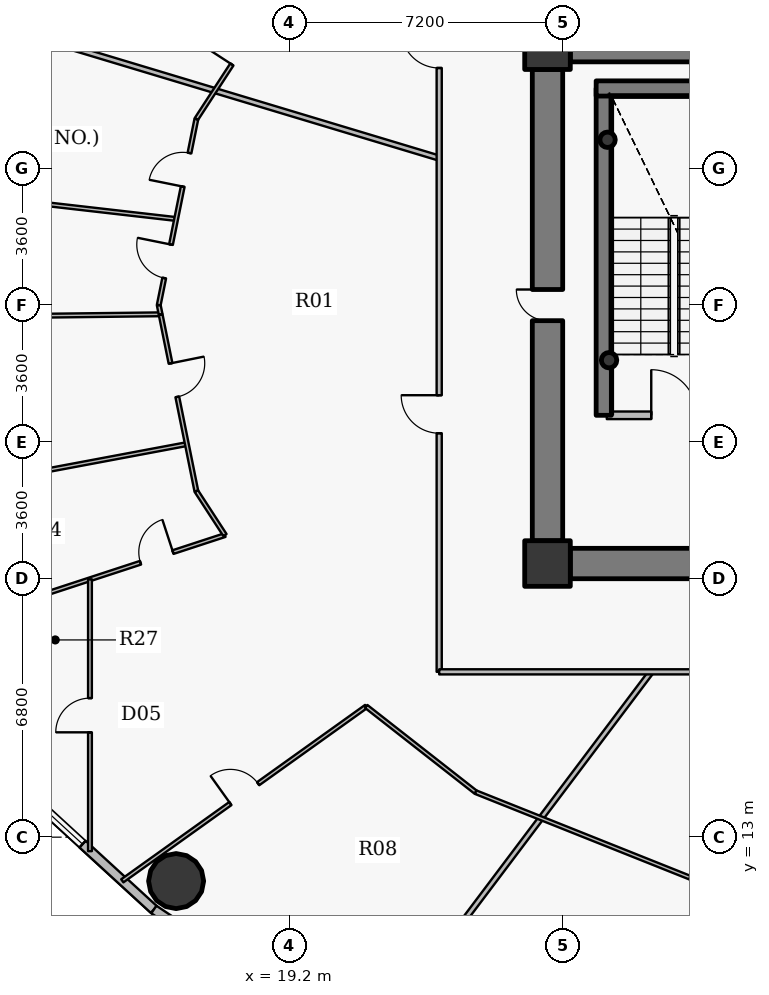
"""IFC4 building model, lengths in metres.
Left out: names, types, materials, properties, quantities, classifications, styles, units other than length and angle.
Written with IfcOpenShell. Run it as: python <this file> out.ifc"""

import sys

from ifc_helpers import new_model, si_unit, direction, frame, frame_2d, origin, origin_2d, place, context, subcontext, project, spatial, rectangle, hollow_circle, extrude, source, transform, mapped, element, fill, save


model = new_model("IFC4")
c1 = context("Model", 3, precision=1e-05, world=origin(), true_north=direction((0.0, 1.0)))
c2 = subcontext(c1, "Body", "Model", "MODEL_VIEW")
j1 = project(units=[si_unit("LENGTHUNIT", "METRE"), si_unit("PLANEANGLEUNIT", "RADIAN")], contexts=[c1])
p1 = place(None, origin())
s1 = spatial("IfcSite", under=j1, at=p1, CompositionType="ELEMENT")
p2 = place(p1, origin())
s2 = spatial("IfcBuilding", under=s1, at=p2, CompositionType="ELEMENT")
p3 = place(p2, frame((0.0, 0.0, 108.45)))
s3 = spatial("IfcBuildingStorey", under=s2, at=p3, CompositionType="ELEMENT", Elevation=108.45)
for number, where, z_axis, x_axis in (
    (1, (26.0, 20.2, 0.0), (0.0, 0.0, 1.0), (1.0, 0.0, 0.0)),
    (2, (26.0, 33.8, 0.0), (0.0, 0.0, 1.0), (1.0, 0.0, 0.0)),
):
    element("IfcColumn", number, at=place(p3, frame(where, z_axis=z_axis, x_axis=x_axis)), inside=s3, PredefinedType="COLUMN", context=c2, shape_type="SweptSolid", body=[
        extrude(rectangle(XDim=1.2, YDim=1.2, at=origin_2d()), origin(), (0.0, 0.0, 1.0), 3.75),
    ])
p4 = place(p3, frame((27.48, 24.1, 0.0), z_axis=(0.0, 0.0, 1.0), x_axis=(0.0, 1.0, 0.0)))
e3 = element("IfcWall", 3, at=p4, inside=s3, PredefinedType="SHEAR", context=c2, shape_type="SweptSolid", body=[
    extrude(rectangle(XDim=8.6, YDim=0.4, at=frame_2d((4.3, 0.0))), origin(), (0.0, 0.0, 1.0), 3.75),
])
p5 = place(p3, frame((27.28, 32.7, 0.0), z_axis=(0.0, 0.0, 1.0), x_axis=(1.0, 0.0, 0.0)))
e4 = element("IfcWall", 4, at=p5, inside=s3, PredefinedType="SHEAR", context=c2, shape_type="SweptSolid", body=[
    extrude(rectangle(XDim=4.1, YDim=0.4, at=frame_2d((2.05, 0.0))), origin(), (0.0, 0.0, 1.0), 3.75),
])
for number, where, z_axis, x_axis in (
    (5, (27.58, 31.35, 0.0), (0.0, 0.0, 1.0), (1.0, 0.0, 0.0)),
    (6, (27.62, 25.55, 0.0), (0.0, 0.0, 1.0), (1.0, 0.0, 0.0)),
):
    element("IfcColumn", number, at=place(p3, frame(where, z_axis=z_axis, x_axis=x_axis)), inside=s3, PredefinedType="COLUMN", context=c2, shape_type="SweptSolid", body=[
        extrude(hollow_circle(Radius=0.203, WallThickness=0.016, at=origin_2d()), origin(), (0.0, 0.0, 1.0), 3.75),
    ])
p6 = place(p3, frame((26.6, 33.8, 0.0), z_axis=(0.0, 0.0, 1.0), x_axis=(1.0, 0.0, 0.0)))
e7 = element("IfcWall", 7, at=p6, inside=s3, PredefinedType="SHEAR", context=c2, shape_type="SweptSolid", body=[
    extrude(rectangle(XDim=18.8, YDim=0.8, at=frame_2d((9.4, 0.0))), origin(), (0.0, 0.0, 1.0), 2.95),
])
p7 = place(p3, frame((45.4, 20.2, 0.0), z_axis=(0.0, 0.0, 1.0), x_axis=(-1.0, 0.0, 0.0)))
e8 = element("IfcWall", 8, at=p7, inside=s3, PredefinedType="SHEAR", context=c2, shape_type="SweptSolid", body=[
    extrude(rectangle(XDim=18.8, YDim=0.8, at=frame_2d((9.4, 0.0))), origin(), (0.0, 0.0, 1.0), 2.95),
])
p8 = place(p7, frame((10.15, 0.0, 0.0)))
e9 = element("IfcOpeningElement", 9, at=p8, cuts=e8, PredefinedType="OPENING", context=c2, shape_type="SweptSolid", body=[
    extrude(rectangle(XDim=1.15, YDim=2.15, at=origin_2d()), frame((0.575, 0.41, 1.075), z_axis=(0.0, -1.0, 0.0), x_axis=(1.0, 0.0, 0.0)), (0.0, 0.0, 1.0), 0.82),
])
p9 = place(p3, frame((26.0, 20.8, 0.0), z_axis=(0.0, 0.0, 1.0), x_axis=(0.0, 1.0, 0.0)))
e10 = element("IfcWall", 10, at=p9, inside=s3, PredefinedType="SHEAR", context=c2, shape_type="SweptSolid", body=[
    extrude(rectangle(XDim=12.4, YDim=0.8, at=frame_2d((6.2, 0.0))), origin(), (0.0, 0.0, 1.0), 2.95),
])
p10 = place(p9, frame((5.79, 0.0, 0.0)))
e11 = element("IfcOpeningElement", 11, at=p10, cuts=e10, PredefinedType="OPENING", context=c2, shape_type="SweptSolid", body=[
    extrude(rectangle(XDim=0.82, YDim=2.1, at=origin_2d()), frame((0.41, 0.41, 1.05), z_axis=(0.0, -1.0, 0.0), x_axis=(1.0, 0.0, 0.0)), (0.0, 0.0, 1.0), 0.82),
])
p11 = place(p3, frame((16.227, 11.844, 0.0), z_axis=(0.0, 0.0, 1.0), x_axis=(1.0, 0.0, 0.0)))
e12 = element("IfcColumn", 12, at=p11, inside=s3, PredefinedType="COLUMN", context=c2, shape_type="SweptSolid", body=[
    extrude(hollow_circle(Radius=0.725, WallThickness=0.042, at=origin_2d()), origin(), (0.0, 0.0, 1.0), 3.75),
])
p12 = place(p3, frame((15.642, 11.097, 0.0), z_axis=(0.0, 0.0, 1.0), x_axis=(-0.737113356241, 0.675769117414, 0.0)))
e13 = element("IfcWall", 13, at=p12, inside=s3, PredefinedType="SOLIDWALL", context=c2, shape_type="SweptSolid", body=[
    extrude(rectangle(XDim=3.976, YDim=0.24, at=frame_2d((1.988, 0.0))), origin(), (0.0, 0.0, 1.0), 3.5),
])
p13 = place(p12, frame((2.546, 0.0, 0.9)))
e14 = element("IfcOpeningElement", 14, at=p13, cuts=e13, PredefinedType="OPENING", context=c2, shape_type="SweptSolid", body=[
    extrude(rectangle(XDim=1.25, YDim=1.65, at=origin_2d()), frame((0.625, 0.13, 0.825), z_axis=(0.0, -1.0, 0.0), x_axis=(1.0, 0.0, 0.0)), (0.0, 0.0, 1.0), 0.26),
])
p14 = place(p3, frame((19.075, 8.801, 0.0), z_axis=(0.0, 0.0, 1.0), x_axis=(-0.831221811447, 0.555940914284, 0.0)))
e15 = element("IfcWall", 15, at=p14, inside=s3, PredefinedType="SOLIDWALL", context=c2, shape_type="SweptSolid", body=[
    extrude(rectangle(XDim=4.13, YDim=0.24, at=frame_2d((2.065, 0.0))), origin(), (0.0, 0.0, 1.0), 3.5),
])
p15 = place(p14, frame((1.065, 0.0, 0.9)))
e16 = element("IfcOpeningElement", 16, at=p15, cuts=e15, PredefinedType="OPENING", context=c2, shape_type="SweptSolid", body=[
    extrude(rectangle(XDim=2.0, YDim=1.75, at=origin_2d()), frame((1.0, 0.13, 0.875), z_axis=(0.0, -1.0, 0.0), x_axis=(1.0, 0.0, 0.0)), (0.0, 0.0, 1.0), 0.26),
])
p16 = place(p3, frame((7.255, 26.655, 0.0), z_axis=(0.0, 0.0, 1.0), x_axis=(0.999927994094, 0.012000276098, 0.0)))
e17 = element("IfcWall", 17, at=p16, inside=s3, PredefinedType="PARTITIONING", context=c2, shape_type="SweptSolid", body=[
    extrude(rectangle(XDim=8.565, YDim=0.1, at=frame_2d((4.283, 0.0))), origin(), (0.0, 0.0, 1.0), 2.935),
])
p17 = place(p3, frame((7.548, 30.259, 0.0), z_axis=(0.0, 0.0, 1.0), x_axis=(0.993502465776, -0.11381059044, 0.0)))
e18 = element("IfcWall", 18, at=p17, inside=s3, PredefinedType="PARTITIONING", context=c2, shape_type="SweptSolid", body=[
    extrude(rectangle(XDim=8.737, YDim=0.1, at=frame_2d((4.369, 0.0))), origin(), (0.0, 0.0, 1.0), 2.935),
])
p18 = place(p3, frame((8.1, 21.765, 0.0), z_axis=(0.0, 0.0, 1.0), x_axis=(0.982848598081, 0.184414297849, 0.0)))
e19 = element("IfcWall", 19, at=p18, inside=s3, PredefinedType="PARTITIONING", context=c2, shape_type="SweptSolid", body=[
    extrude(rectangle(XDim=8.556, YDim=0.1, at=frame_2d((4.278, 0.0))), origin(), (0.0, 0.0, 1.0), 2.935),
])
p19 = place(p3, frame((9.215, 35.062, 0.0), z_axis=(0.0, 0.0, 1.0), x_axis=(0.957569176287, -0.288203526393, 0.0)))
e20 = element("IfcWall", 20, at=p19, inside=s3, PredefinedType="PARTITIONING", context=c2, shape_type="SweptSolid", body=[
    extrude(rectangle(XDim=14.552, YDim=0.135, at=frame_2d((7.276, 0.0))), origin(), (0.0, 0.0, 1.0), 2.935),
])
p20 = place(p3, frame((9.533, 18.337, 0.0), z_axis=(0.0, 0.0, 1.0), x_axis=(0.950384937961, 0.311076308478, 0.0)))
e21 = element("IfcWall", 21, at=p20, inside=s3, PredefinedType="PARTITIONING", context=c2, shape_type="SweptSolid", body=[
    extrude(rectangle(XDim=8.396, YDim=0.1, at=frame_2d((4.198, 0.0))), origin(), (0.0, 0.0, 1.0), 2.935),
])
p21 = place(p20, frame((6.057, 0.0, 0.0)))
e22 = element("IfcOpeningElement", 22, at=p21, cuts=e21, PredefinedType="OPENING", context=c2, shape_type="SweptSolid", body=[
    extrude(rectangle(XDim=0.9, YDim=2.1, at=origin_2d()), frame((0.45, 0.06, 1.05), z_axis=(0.0, -1.0, 0.0), x_axis=(1.0, 0.0, 0.0)), (0.0, 0.0, 1.0), 0.12),
])
p22 = place(p20, frame((0.88, 0.0, 0.0)))
e23 = element("IfcOpeningElement", 23, at=p22, cuts=e21, PredefinedType="OPENING", context=c2, shape_type="SweptSolid", body=[
    extrude(rectangle(XDim=0.82, YDim=2.1, at=origin_2d()), frame((0.41, 0.06, 1.05), z_axis=(0.0, -1.0, 0.0), x_axis=(1.0, 0.0, 0.0)), (0.0, 0.0, 1.0), 0.12),
])
p23 = place(p3, frame((13.96, 12.631, 0.0), z_axis=(0.0, 0.0, 1.0), x_axis=(0.0, 1.0, 0.0)))
e24 = element("IfcWall", 24, at=p23, inside=s3, PredefinedType="PARTITIONING", context=c2, shape_type="SweptSolid", body=[
    extrude(rectangle(XDim=7.154, YDim=0.1, at=frame_2d((3.577, 0.0))), origin(), (0.0, 0.0, 1.0), 2.935),
])
p24 = place(p23, frame((3.127, 0.0, 0.0)))
e25 = element("IfcOpeningElement", 25, at=p24, cuts=e24, PredefinedType="OPENING", context=c2, shape_type="SweptSolid", body=[
    extrude(rectangle(XDim=0.9, YDim=2.1, at=origin_2d()), frame((0.45, 0.06, 1.05), z_axis=(0.0, -1.0, 0.0), x_axis=(1.0, 0.0, 0.0)), (0.0, 0.0, 1.0), 0.12),
])
p25 = place(p3, frame((14.811, 11.851, 0.0), z_axis=(0.0, 0.0, 1.0), x_axis=(0.813476205606, 0.581598197137, 0.0)))
e26 = element("IfcWall", 26, at=p25, inside=s3, PredefinedType="PARTITIONING", context=c2, shape_type="SweptSolid", body=[
    extrude(rectangle(XDim=7.889, YDim=0.1, at=frame_2d((3.945, 0.0))), origin(), (0.0, 0.0, 1.0), 2.935),
])
p26 = place(p25, frame((3.495, 0.0, 0.0)))
e27 = element("IfcOpeningElement", 27, at=p26, cuts=e26, PredefinedType="OPENING", context=c2, shape_type="SweptSolid", body=[
    extrude(rectangle(XDim=0.9, YDim=2.1, at=origin_2d()), frame((0.45, 0.06, 1.05), z_axis=(0.0, -1.0, 0.0), x_axis=(1.0, 0.0, 0.0)), (0.0, 0.0, 1.0), 0.12),
])
p27 = place(p3, frame((15.77, 27.0, 0.0), z_axis=(0.0, 0.0, 1.0), x_axis=(0.198585481658, -0.980083571169, 0.0)))
e28 = element("IfcWall", 28, at=p27, inside=s3, PredefinedType="PARTITIONING", context=c2, shape_type="SweptSolid", body=[
    extrude(rectangle(XDim=0.247, YDim=0.1, at=frame_2d((0.124, 0.0))), origin(), (0.0, 0.0, 1.0), 2.935),
])
p28 = place(p3, frame((15.77, 27.0, 0.0), z_axis=(0.0, 0.0, 1.0), x_axis=(0.19822142127, 0.980157267049, 0.0)))
e29 = element("IfcWall", 29, at=p28, inside=s3, PredefinedType="PARTITIONING", context=c2, shape_type="SweptSolid", body=[
    extrude(rectangle(XDim=4.994, YDim=0.1, at=frame_2d((2.497, 0.0))), origin(), (0.0, 0.0, 1.0), 2.935),
])
p29 = place(p28, frame((3.183, 0.0, 0.0)))
e30 = element("IfcOpeningElement", 30, at=p29, cuts=e29, PredefinedType="OPENING", context=c2, shape_type="SweptSolid", body=[
    extrude(rectangle(XDim=0.9, YDim=2.1, at=origin_2d()), frame((0.45, 0.06, 1.05), z_axis=(0.0, -1.0, 0.0), x_axis=(1.0, 0.0, 0.0)), (0.0, 0.0, 1.0), 0.12),
])
p30 = place(p28, frame((0.725, 0.0, 0.0)))
e31 = element("IfcOpeningElement", 31, at=p30, cuts=e29, PredefinedType="OPENING", context=c2, shape_type="SweptSolid", body=[
    extrude(rectangle(XDim=0.9, YDim=2.1, at=origin_2d()), frame((0.45, 0.06, 1.05), z_axis=(0.0, -1.0, 0.0), x_axis=(1.0, 0.0, 0.0)), (0.0, 0.0, 1.0), 0.12),
])
p31 = place(p3, frame((15.821, 26.748, 0.0), z_axis=(0.0, 0.0, 1.0), x_axis=(0.198216867743, -0.980158187918, 0.0)))
e32 = element("IfcWall", 32, at=p31, inside=s3, PredefinedType="PARTITIONING", context=c2, shape_type="SweptSolid", body=[
    extrude(rectangle(XDim=4.737, YDim=0.1, at=frame_2d((2.369, 0.0))), origin(), (0.0, 0.0, 1.0), 2.935),
])
p32 = place(p31, frame((1.307, 0.0, 0.0)))
e33 = element("IfcOpeningElement", 33, at=p32, cuts=e32, PredefinedType="OPENING", context=c2, shape_type="SweptSolid", body=[
    extrude(rectangle(XDim=0.9, YDim=2.1, at=origin_2d()), frame((0.45, 0.06, 1.05), z_axis=(0.0, -1.0, 0.0), x_axis=(1.0, 0.0, 0.0)), (0.0, 0.0, 1.0), 0.12),
])
p33 = place(p3, frame((16.76, 22.105, 0.0), z_axis=(0.0, 0.0, 1.0), x_axis=(0.54547956044, -0.83812412514, 0.0)))
e34 = element("IfcWall", 34, at=p33, inside=s3, PredefinedType="PARTITIONING", context=c2, shape_type="SweptSolid", body=[
    extrude(rectangle(XDim=1.38, YDim=0.1, at=frame_2d((0.69, 0.0))), origin(), (0.0, 0.0, 1.0), 2.935),
])
p34 = place(p3, frame((16.76, 31.895, 0.0), z_axis=(0.0, 0.0, 1.0), x_axis=(0.545405249109, 0.838172484781, 0.0)))
e35 = element("IfcWall", 35, at=p34, inside=s3, PredefinedType="PARTITIONING", context=c2, shape_type="SweptSolid", body=[
    extrude(rectangle(XDim=5.269, YDim=0.1, at=frame_2d((2.634, 0.0))), origin(), (0.0, 0.0, 1.0), 2.935),
])
p35 = place(p34, frame((1.713, 0.0, 0.0)))
e36 = element("IfcOpeningElement", 36, at=p35, cuts=e35, PredefinedType="OPENING", context=c2, shape_type="SweptSolid", body=[
    extrude(rectangle(XDim=0.9, YDim=2.1, at=origin_2d()), frame((0.45, 0.06, 1.05), z_axis=(0.0, -1.0, 0.0), x_axis=(1.0, 0.0, 0.0)), (0.0, 0.0, 1.0), 0.12),
])
p36 = place(p3, frame((21.229, 16.44, 0.0), z_axis=(0.0, 0.0, 1.0), x_axis=(0.787324700524, -0.616538576201, 0.0)))
e37 = element("IfcWall", 37, at=p36, inside=s3, PredefinedType="PARTITIONING", context=c2, shape_type="SweptSolid", body=[
    extrude(rectangle(XDim=3.658, YDim=0.1, at=frame_2d((1.829, 0.0))), origin(), (0.0, 0.0, 1.0), 2.935),
])
p37 = place(p3, frame((21.43, 7.665, 0.0), z_axis=(0.0, 0.0, 1.0), x_axis=(0.601821582461, 0.798630567211, 0.0)))
e38 = element("IfcWall", 38, at=p37, inside=s3, PredefinedType="PARTITIONING", context=c2, shape_type="SweptSolid", body=[
    extrude(rectangle(XDim=12.127, YDim=0.135, at=frame_2d((6.063, 0.0))), origin(), (0.0, 0.0, 1.0), 2.935),
])
p38 = place(p3, frame((23.15, 17.35, 0.0), z_axis=(0.0, 0.0, 1.0), x_axis=(0.0, 1.0, 0.0)))
e39 = element("IfcWall", 39, at=p38, inside=s3, PredefinedType="PARTITIONING", context=c2, shape_type="SweptSolid", body=[
    extrude(rectangle(XDim=19.3, YDim=0.135, at=frame_2d((9.65, 0.0))), origin(), (0.0, 0.0, 1.0), 2.935),
])
p39 = place(p38, frame((15.889, 0.0, 0.0)))
e40 = element("IfcOpeningElement", 40, at=p39, cuts=e39, PredefinedType="OPENING", context=c2, shape_type="SweptSolid", body=[
    extrude(rectangle(XDim=1.0, YDim=2.15, at=origin_2d()), frame((0.5, 0.078, 1.075), z_axis=(0.0, -1.0, 0.0), x_axis=(1.0, 0.0, 0.0)), (0.0, 0.0, 1.0), 0.155),
])
p40 = place(p38, frame((6.279, 0.0, 0.0)))
e41 = element("IfcOpeningElement", 41, at=p40, cuts=e39, PredefinedType="OPENING", context=c2, shape_type="SweptSolid", body=[
    extrude(rectangle(XDim=1.0, YDim=2.15, at=origin_2d()), frame((0.5, 0.078, 1.075), z_axis=(0.0, -1.0, 0.0), x_axis=(1.0, 0.0, 0.0)), (0.0, 0.0, 1.0), 0.155),
])
p41 = place(p3, frame((23.15, 17.35, 0.0), z_axis=(0.0, 0.0, 1.0), x_axis=(1.0, 0.0, 0.0)))
e42 = element("IfcWall", 42, at=p41, inside=s3, PredefinedType="PARTITIONING", context=c2, shape_type="SweptSolid", body=[
    extrude(rectangle(XDim=12.808, YDim=0.135, at=frame_2d((6.404, 0.0))), origin(), (0.0, 0.0, 1.0), 2.935),
])
p42 = place(p41, frame((8.673, 0.0, 0.0)))
e43 = element("IfcOpeningElement", 43, at=p42, cuts=e42, PredefinedType="OPENING", context=c2, shape_type="SweptSolid", body=[
    extrude(rectangle(XDim=1.0, YDim=2.15, at=origin_2d()), frame((0.5, 0.078, 1.075), z_axis=(0.0, -1.0, 0.0), x_axis=(1.0, 0.0, 0.0)), (0.0, 0.0, 1.0), 0.155),
])
p43 = place(p3, frame((24.109, 14.184, 0.0), z_axis=(0.0, 0.0, 1.0), x_axis=(0.928803554156, -0.370572473055, 0.0)))
e44 = element("IfcWall", 44, at=p43, inside=s3, PredefinedType="PARTITIONING", context=c2, shape_type="SweptSolid", body=[
    extrude(rectangle(XDim=6.072, YDim=0.1, at=frame_2d((3.036, 0.0))), origin(), (0.0, 0.0, 1.0), 2.935),
])
p44 = place(p3, frame((27.56, 24.1, 0.0), z_axis=(0.0, 0.0, 1.0), x_axis=(1.0, 0.0, 0.0)))
e45 = element("IfcWall", 45, at=p44, inside=s3, PredefinedType="PARTITIONING", context=c2, shape_type="SweptSolid", body=[
    extrude(rectangle(XDim=3.54, YDim=0.2, at=frame_2d((1.77, 0.0))), origin(), (0.0, 0.0, 1.0), 3.5),
])
p45 = place(p44, frame((1.17, 0.0, 0.0)))
e46 = element("IfcOpeningElement", 46, at=p45, cuts=e45, PredefinedType="OPENING", context=c2, shape_type="SweptSolid", body=[
    extrude(rectangle(XDim=1.2, YDim=2.15, at=origin_2d()), frame((0.6, 0.11, 1.075), z_axis=(0.0, -1.0, 0.0), x_axis=(1.0, 0.0, 0.0)), (0.0, 0.0, 1.0), 0.22),
])
p46 = place(p3, frame((28.685, 5.296, 0.0), z_axis=(0.0, 0.0, 1.0), x_axis=(0.319387131438, 0.947624324441, 0.0)))
e47 = element("IfcWall", 47, at=p46, inside=s3, PredefinedType="PARTITIONING", context=c2, shape_type="SweptSolid", body=[
    extrude(rectangle(XDim=6.858, YDim=0.1, at=frame_2d((3.429, 0.0))), origin(), (0.0, 0.0, 1.0), 2.935),
])
p47 = place(p46, frame((2.979, 0.0, 0.0)))
e48 = element("IfcOpeningElement", 48, at=p47, cuts=e47, PredefinedType="OPENING", context=c2, shape_type="SweptSolid", body=[
    extrude(rectangle(XDim=0.9, YDim=2.1, at=origin_2d()), frame((0.45, 0.06, 1.05), z_axis=(0.0, -1.0, 0.0), x_axis=(1.0, 0.0, 0.0)), (0.0, 0.0, 1.0), 0.12),
])
p48 = place(p3, frame((25.6, 33.893, 0.0), z_axis=(0.0, 0.0, 1.0), x_axis=(0.0, -1.0, 0.0)))
e49 = element("IfcWall", 49, at=p48, inside=s3, PredefinedType="PARTITIONING", context=c2, shape_type="SweptSolid", body=[
    extrude(rectangle(XDim=0.683, YDim=0.135, at=frame_2d((0.341, 0.0))), origin(), (0.0, 0.0, 1.0), 3.5),
])
p49 = place(p3, frame((25.6, 20.79, 0.0), z_axis=(0.0, 0.0, 1.0), x_axis=(0.0, -1.0, 0.0)))
e50 = element("IfcWall", 50, at=p49, inside=s3, PredefinedType="PARTITIONING", context=c2, shape_type="SweptSolid", body=[
    extrude(rectangle(XDim=0.99, YDim=0.135, at=frame_2d((0.495, 0.0))), origin(), (0.0, 0.0, 1.0), 3.5),
])
p50 = place(p3, frame((25.907, 19.8, 0.0), z_axis=(0.0, 0.0, 1.0), x_axis=(1.0, 0.0, 0.0)))
e51 = element("IfcWall", 51, at=p50, inside=s3, PredefinedType="PARTITIONING", context=c2, shape_type="SweptSolid", body=[
    extrude(rectangle(XDim=0.683, YDim=0.135, at=frame_2d((0.341, 0.0))), origin(), (0.0, 0.0, 1.0), 2.935),
])
m1 = source(origin(), c2, "Body", "SweptSolid", [
    extrude(rectangle(XDim=1.25, YDim=1.65, at=origin_2d()), frame((0.625, 0.03, 0.825), z_axis=(0.0, -1.0, 0.0), x_axis=(1.0, 0.0, 0.0)), (0.0, 0.0, 1.0), 0.06),
])
p51 = place(p13, origin())
e52 = element("IfcWindow", 52, at=p51, inside=s3, PartitioningType="SINGLE_PANEL", PredefinedType="WINDOW", context=c2, shape_type="MappedRepresentation", body=[
    mapped(m1, transform((0.0, 0.0, 0.0), x_axis=(1.0, 0.0, 0.0), y_axis=(0.0, 1.0, 0.0), z_axis=(0.0, 0.0, 1.0), scale=1.0)),
])
fill(e14, e52)
m2 = source(origin(), c2, "Body", "SweptSolid", [
    extrude(rectangle(XDim=0.82, YDim=2.1, at=origin_2d()), frame((0.41, 0.025, 1.05), z_axis=(0.0, -1.0, 0.0), x_axis=(1.0, 0.0, 0.0)), (0.0, 0.0, 1.0), 0.05),
])
p52 = place(p10, origin())
e53 = element("IfcDoor", 53, at=p52, inside=s3, OperationType="SINGLE_SWING_RIGHT", PredefinedType="DOOR", context=c2, shape_type="MappedRepresentation", body=[
    mapped(m2, transform((0.0, 0.0, 0.0), x_axis=(1.0, 0.0, 0.0), y_axis=(0.0, 1.0, 0.0), z_axis=(0.0, 0.0, 1.0), scale=1.0)),
])
fill(e11, e53)
m3 = source(origin(), c2, "Body", "SweptSolid", [
    extrude(rectangle(XDim=1.2, YDim=2.15, at=origin_2d()), frame((0.6, 0.025, 1.075), z_axis=(0.0, -1.0, 0.0), x_axis=(1.0, 0.0, 0.0)), (0.0, 0.0, 1.0), 0.05),
])
p53 = place(p45, origin())
e54 = element("IfcDoor", 54, at=p53, inside=s3, OperationType="SINGLE_SWING_LEFT", PredefinedType="DOOR", context=c2, shape_type="MappedRepresentation", body=[
    mapped(m3, transform((0.0, 0.0, 0.0), x_axis=(1.0, 0.0, 0.0), y_axis=(0.0, 1.0, 0.0), z_axis=(0.0, 0.0, 1.0), scale=1.0)),
])
fill(e46, e54)
m4 = source(origin(), c2, "Body", "SweptSolid", [
    extrude(rectangle(XDim=1.0, YDim=2.15, at=origin_2d()), frame((0.5, 0.025, 1.075), z_axis=(0.0, -1.0, 0.0), x_axis=(1.0, 0.0, 0.0)), (0.0, 0.0, 1.0), 0.05),
])
p54 = place(p39, origin())
e55 = element("IfcDoor", 55, at=p54, inside=s3, OperationType="SINGLE_SWING_RIGHT", PredefinedType="DOOR", context=c2, shape_type="MappedRepresentation", body=[
    mapped(m4, transform((0.0, 0.0, 0.0), x_axis=(1.0, 0.0, 0.0), y_axis=(0.0, 1.0, 0.0), z_axis=(0.0, 0.0, 1.0), scale=1.0)),
])
fill(e40, e55)
m5 = source(origin(), c2, "Body", "SweptSolid", [
    extrude(rectangle(XDim=0.9, YDim=2.1, at=origin_2d()), frame((0.45, 0.025, 1.05), z_axis=(0.0, -1.0, 0.0), x_axis=(1.0, 0.0, 0.0)), (0.0, 0.0, 1.0), 0.05),
])
p55 = place(p35, origin())
e56 = element("IfcDoor", 56, at=p55, inside=s3, OperationType="SINGLE_SWING_LEFT", PredefinedType="DOOR", context=c2, shape_type="MappedRepresentation", body=[
    mapped(m5, transform((0.0, 0.0, 0.0), x_axis=(1.0, 0.0, 0.0), y_axis=(0.0, 1.0, 0.0), z_axis=(0.0, 0.0, 1.0), scale=1.0)),
])
fill(e36, e56)
p56 = place(p40, origin())
e57 = element("IfcDoor", 57, at=p56, inside=s3, OperationType="SINGLE_SWING_RIGHT", PredefinedType="DOOR", context=c2, shape_type="MappedRepresentation", body=[
    mapped(m4, transform((0.0, 0.0, 0.0), x_axis=(1.0, 0.0, 0.0), y_axis=(0.0, 1.0, 0.0), z_axis=(0.0, 0.0, 1.0), scale=1.0)),
])
fill(e41, e57)
p57 = place(p29, origin())
e58 = element("IfcDoor", 58, at=p57, inside=s3, OperationType="SINGLE_SWING_LEFT", PredefinedType="DOOR", context=c2, shape_type="MappedRepresentation", body=[
    mapped(m5, transform((0.0, 0.0, 0.0), x_axis=(1.0, 0.0, 0.0), y_axis=(0.0, 1.0, 0.0), z_axis=(0.0, 0.0, 1.0), scale=1.0)),
])
fill(e30, e58)
p58 = place(p30, origin())
e59 = element("IfcDoor", 59, at=p58, inside=s3, OperationType="SINGLE_SWING_RIGHT", PredefinedType="DOOR", context=c2, shape_type="MappedRepresentation", body=[
    mapped(m5, transform((0.0, 0.0, 0.0), x_axis=(1.0, 0.0, 0.0), y_axis=(0.0, 1.0, 0.0), z_axis=(0.0, 0.0, 1.0), scale=1.0)),
])
fill(e31, e59)
p59 = place(p32, origin())
e60 = element("IfcDoor", 60, at=p59, inside=s3, OperationType="SINGLE_SWING_LEFT", PredefinedType="DOOR", context=c2, shape_type="MappedRepresentation", body=[
    mapped(m5, transform((0.0, 0.0, 0.0), x_axis=(1.0, 0.0, 0.0), y_axis=(0.0, 1.0, 0.0), z_axis=(0.0, 0.0, 1.0), scale=1.0)),
])
fill(e33, e60)
p60 = place(p21, origin())
e61 = element("IfcDoor", 61, at=p60, inside=s3, OperationType="SINGLE_SWING_RIGHT", PredefinedType="DOOR", context=c2, shape_type="MappedRepresentation", body=[
    mapped(m5, transform((0.0, 0.0, 0.0), x_axis=(1.0, 0.0, 0.0), y_axis=(0.0, 1.0, 0.0), z_axis=(0.0, 0.0, 1.0), scale=1.0)),
])
fill(e22, e61)
p61 = place(p26, origin())
e62 = element("IfcDoor", 62, at=p61, inside=s3, OperationType="SINGLE_SWING_LEFT", PredefinedType="DOOR", context=c2, shape_type="MappedRepresentation", body=[
    mapped(m5, transform((0.0, 0.0, 0.0), x_axis=(1.0, 0.0, 0.0), y_axis=(0.0, 1.0, 0.0), z_axis=(0.0, 0.0, 1.0), scale=1.0)),
])
fill(e27, e62)
p62 = place(p24, origin())
e63 = element("IfcDoor", 63, at=p62, inside=s3, OperationType="SINGLE_SWING_LEFT", PredefinedType="DOOR", context=c2, shape_type="MappedRepresentation", body=[
    mapped(m5, transform((0.0, 0.0, 0.0), x_axis=(1.0, 0.0, 0.0), y_axis=(0.0, 1.0, 0.0), z_axis=(0.0, 0.0, 1.0), scale=1.0)),
])
fill(e25, e63)
save(model, sys.argv[1])
